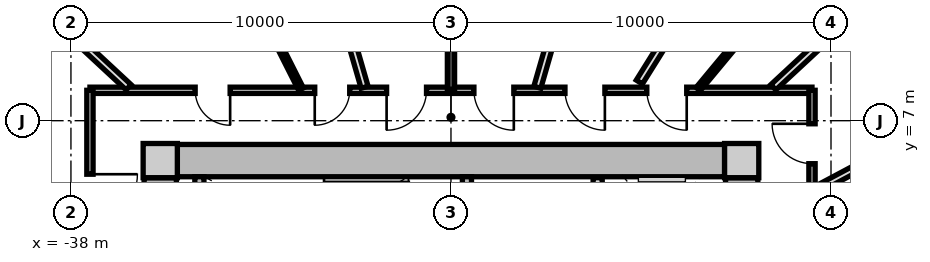
"""IFC4 building model, lengths in metres.
Left out: names, types, materials, properties, quantities, classifications, styles, units other than length and angle.
Written with IfcOpenShell. Run it as: python <this file> out.ifc"""

import sys

from ifc_helpers import new_model, si_unit, direction, frame, frame_2d, origin, origin_2d, place, context, subcontext, project, spatial, rectangle, extrude, source, transform, mapped, element, fill, save


model = new_model("IFC4")
c1 = context("Model", 3, precision=1e-05, world=origin(), true_north=direction((0.0, 1.0)))
c2 = subcontext(c1, "Body", "Model", "MODEL_VIEW")
j1 = project(units=[si_unit("LENGTHUNIT", "METRE"), si_unit("PLANEANGLEUNIT", "RADIAN")], contexts=[c1])
p1 = place(None, origin())
s1 = spatial("IfcSite", under=j1, at=p1, CompositionType="ELEMENT")
p2 = place(p1, origin())
s2 = spatial("IfcBuilding", under=s1, at=p2, CompositionType="ELEMENT")
p3 = place(p2, frame((0.0, 0.0, 27.7)))
s3 = spatial("IfcBuildingStorey", under=s2, at=p3, CompositionType="ELEMENT", Elevation=27.7)
m1 = source(origin(), c2, "Body", "SweptSolid", [
    extrude(rectangle(XDim=0.9, YDim=0.9, at=origin_2d()), origin(), (0.0, 0.0, 1.0), 3.05),
])
for number, where, z_axis, x_axis in (
    (1, (-20.35, 5.95, 0.0), (0.0, 0.0, 1.0), (1.0, 0.0, 0.0)),
    (2, (-35.65, 5.95, 0.0), (0.0, 0.0, 1.0), (1.0, 0.0, 0.0)),
):
    element("IfcColumn", number, at=place(p3, frame(where, z_axis=z_axis, x_axis=x_axis)), inside=s3, PredefinedType="COLUMN", context=c2, shape_type="MappedRepresentation", body=[
        mapped(m1, transform((0.0, 0.0, 0.0), x_axis=(1.0, 0.0, 0.0), y_axis=(0.0, 1.0, 0.0), z_axis=(0.0, 0.0, 1.0), scale=1.0)),
    ])
m2 = source(origin(), c2, "Body", "SweptSolid", [
    extrude(rectangle(XDim=14.4, YDim=0.85, at=frame_2d((7.2, 0.0))), origin(), (0.0, 0.0, 1.0), 2.79),
])
p4 = place(p3, frame((-35.2, 5.95, 0.0), z_axis=(0.0, 0.0, 1.0), x_axis=(1.0, 0.0, 0.0)))
e3 = element("IfcWall", 3, at=p4, inside=s3, PredefinedType="SHEAR", context=c2, shape_type="MappedRepresentation", body=[
    mapped(m2, transform((0.0, 0.0, 0.0), x_axis=(1.0, 0.0, 0.0), y_axis=(0.0, 1.0, 0.0), z_axis=(0.0, 0.0, 1.0), scale=1.0)),
])
m3 = source(origin(), c2, "Body", "SweptSolid", [
    extrude(rectangle(XDim=11.0, YDim=0.85, at=frame_2d((5.5, 0.0))), origin(), (0.0, 0.0, 1.0), 2.79),
])
p5 = place(p3, frame((-35.65, -5.5, 0.0), z_axis=(0.0, 0.0, 1.0), x_axis=(0.0, 1.0, 0.0)))
e4 = element("IfcWall", 4, at=p5, inside=s3, PredefinedType="SHEAR", context=c2, shape_type="MappedRepresentation", body=[
    mapped(m3, transform((0.0, 0.0, 0.0), x_axis=(1.0, 0.0, 0.0), y_axis=(0.0, 1.0, 0.0), z_axis=(0.0, 0.0, 1.0), scale=1.0)),
])
p6 = place(p5, frame((3.8, 0.0, 0.0)))
e5 = element("IfcOpeningElement", 5, at=p6, cuts=e4, PredefinedType="OPENING", context=c2, shape_type="SweptSolid", body=[
    extrude(rectangle(XDim=1.2, YDim=2.15, at=frame_2d((0.6, 1.075))), frame((0.0, 0.435, 0.0), z_axis=(0.0, -1.0, 0.0), x_axis=(1.0, 0.0, 0.0)), (0.0, 0.0, 1.0), 0.87),
])
p7 = place(p3, frame((-20.35, 5.5, 0.0), z_axis=(0.0, 0.0, 1.0), x_axis=(0.0, -1.0, 0.0)))
e6 = element("IfcWall", 6, at=p7, inside=s3, PredefinedType="SHEAR", context=c2, shape_type="MappedRepresentation", body=[
    mapped(m3, transform((0.0, 0.0, 0.0), x_axis=(1.0, 0.0, 0.0), y_axis=(0.0, 1.0, 0.0), z_axis=(0.0, 0.0, 1.0), scale=1.0)),
])
p8 = place(p7, frame((5.65, 0.0, 0.0)))
e7 = element("IfcOpeningElement", 7, at=p8, cuts=e6, PredefinedType="OPENING", context=c2, shape_type="SweptSolid", body=[
    extrude(rectangle(XDim=1.2, YDim=2.15, at=frame_2d((0.6, 1.075))), frame((0.0, 0.435, 0.0), z_axis=(0.0, -1.0, 0.0), x_axis=(1.0, 0.0, 0.0)), (0.0, 0.0, 1.0), 0.87),
])
m4 = source(origin(), c2, "Body", "SweptSolid", [
    extrude(rectangle(XDim=3.075, YDim=0.24, at=frame_2d((1.538, 0.0))), origin(), (0.0, 0.0, 1.0), 2.79),
])
p9 = place(p3, frame((-34.62, 2.45, 0.0), z_axis=(0.0, 0.0, 1.0), x_axis=(0.0, 1.0, 0.0)))
e8 = element("IfcWall", 8, at=p9, inside=s3, PredefinedType="PARTITIONING", context=c2, shape_type="MappedRepresentation", body=[
    mapped(m4, transform((0.0, 0.0, 0.0), x_axis=(1.0, 0.0, 0.0), y_axis=(0.0, 1.0, 0.0), z_axis=(0.0, 0.0, 1.0), scale=1.0)),
])
p10 = place(p3, frame((-27.58, 2.45, 0.0), z_axis=(0.0, 0.0, 1.0), x_axis=(0.0, 1.0, 0.0)))
e9 = element("IfcWall", 9, at=p10, inside=s3, PredefinedType="PARTITIONING", context=c2, shape_type="MappedRepresentation", body=[
    mapped(m4, transform((0.0, 0.0, 0.0), x_axis=(1.0, 0.0, 0.0), y_axis=(0.0, 1.0, 0.0), z_axis=(0.0, 0.0, 1.0), scale=1.0)),
])
p11 = place(p10, frame((0.55, 0.0, 0.0)))
e10 = element("IfcOpeningElement", 10, at=p11, cuts=e9, PredefinedType="OPENING", context=c2, shape_type="SweptSolid", body=[
    extrude(rectangle(XDim=1.1, YDim=2.15, at=frame_2d((0.55, 1.075))), frame((0.0, 0.13, 0.0), z_axis=(0.0, -1.0, 0.0), x_axis=(1.0, 0.0, 0.0)), (0.0, 0.0, 1.0), 0.26),
])
m5 = source(origin(), c2, "Body", "SweptSolid", [
    extrude(rectangle(XDim=5.0, YDim=0.24, at=frame_2d((2.5, 0.0))), origin(), (0.0, 0.0, 1.0), 2.775),
])
p12 = place(p3, frame((-24.14, 0.5, 0.0), z_axis=(0.0, 0.0, 1.0), x_axis=(0.0, 1.0, 0.0)))
e11 = element("IfcWall", 11, at=p12, inside=s3, PredefinedType="PARTITIONING", context=c2, shape_type="MappedRepresentation", body=[
    mapped(m5, transform((0.0, 0.0, 0.0), x_axis=(1.0, 0.0, 0.0), y_axis=(0.0, 1.0, 0.0), z_axis=(0.0, 0.0, 1.0), scale=1.0)),
])
p13 = place(p12, frame((3.05, 0.0, 0.0)))
e12 = element("IfcOpeningElement", 12, at=p13, cuts=e11, PredefinedType="OPENING", context=c2, shape_type="SweptSolid", body=[
    extrude(rectangle(XDim=1.3, YDim=2.2, at=frame_2d((0.65, 1.1))), frame((0.0, 0.13, 0.0), z_axis=(0.0, -1.0, 0.0), x_axis=(1.0, 0.0, 0.0)), (0.0, 0.0, 1.0), 0.26),
])
p14 = place(p12, frame((0.55, 0.0, 0.0)))
e13 = element("IfcOpeningElement", 13, at=p14, cuts=e11, PredefinedType="OPENING", context=c2, shape_type="SweptSolid", body=[
    extrude(rectangle(XDim=1.3, YDim=2.2, at=frame_2d((0.65, 1.1))), frame((0.0, 0.13, 0.0), z_axis=(0.0, -1.0, 0.0), x_axis=(1.0, 0.0, 0.0)), (0.0, 0.0, 1.0), 0.26),
])
m6 = source(origin(), c2, "Body", "SweptSolid", [
    extrude(rectangle(XDim=19.0, YDim=0.165, at=frame_2d((9.5, 0.0))), origin(), (0.0, 0.0, 1.0), 2.775),
])
p15 = place(p3, frame((-37.5, 7.8, 0.0), z_axis=(0.0, 0.0, 1.0), x_axis=(1.0, 0.0, 0.0)))
e14 = element("IfcWall", 14, at=p15, inside=s3, PredefinedType="PARTITIONING", context=c2, shape_type="MappedRepresentation", body=[
    mapped(m6, transform((0.0, 0.0, 0.0), x_axis=(1.0, 0.0, 0.0), y_axis=(0.0, 1.0, 0.0), z_axis=(0.0, 0.0, 1.0), scale=1.0)),
])
p16 = place(p15, frame((14.653, 0.0, 0.0)))
e15 = element("IfcOpeningElement", 15, at=p16, cuts=e14, PredefinedType="OPENING", context=c2, shape_type="SweptSolid", body=[
    extrude(rectangle(XDim=1.05, YDim=2.15, at=frame_2d((0.525, 1.075))), frame((0.0, 0.093, 0.0), z_axis=(0.0, -1.0, 0.0), x_axis=(1.0, 0.0, 0.0)), (0.0, 0.0, 1.0), 0.185),
])
p17 = place(p15, frame((12.5, 0.0, 0.0)))
e16 = element("IfcOpeningElement", 16, at=p17, cuts=e14, PredefinedType="OPENING", context=c2, shape_type="SweptSolid", body=[
    extrude(rectangle(XDim=1.05, YDim=2.15, at=frame_2d((0.525, 1.075))), frame((0.0, 0.093, 0.0), z_axis=(0.0, -1.0, 0.0), x_axis=(1.0, 0.0, 0.0)), (0.0, 0.0, 1.0), 0.185),
])
p18 = place(p15, frame((10.104, 0.0, 0.0)))
e17 = element("IfcOpeningElement", 17, at=p18, cuts=e14, PredefinedType="OPENING", context=c2, shape_type="SweptSolid", body=[
    extrude(rectangle(XDim=1.05, YDim=2.15, at=frame_2d((0.525, 1.075))), frame((0.0, 0.093, 0.0), z_axis=(0.0, -1.0, 0.0), x_axis=(1.0, 0.0, 0.0)), (0.0, 0.0, 1.0), 0.185),
])
p19 = place(p15, frame((7.806, 0.0, 0.0)))
e18 = element("IfcOpeningElement", 18, at=p19, cuts=e14, PredefinedType="OPENING", context=c2, shape_type="SweptSolid", body=[
    extrude(rectangle(XDim=1.05, YDim=2.15, at=frame_2d((0.525, 1.075))), frame((0.0, 0.093, 0.0), z_axis=(0.0, -1.0, 0.0), x_axis=(1.0, 0.0, 0.0)), (0.0, 0.0, 1.0), 0.185),
])
p20 = place(p15, frame((5.915, 0.0, 0.0)))
e19 = element("IfcOpeningElement", 19, at=p20, cuts=e14, PredefinedType="OPENING", context=c2, shape_type="SweptSolid", body=[
    extrude(rectangle(XDim=0.92, YDim=2.1, at=frame_2d((0.46, 1.05))), frame((0.0, 0.093, 0.0), z_axis=(0.0, -1.0, 0.0), x_axis=(1.0, 0.0, 0.0)), (0.0, 0.0, 1.0), 0.185),
])
p21 = place(p15, frame((2.769, 0.0, 0.0)))
e20 = element("IfcOpeningElement", 20, at=p21, cuts=e14, PredefinedType="OPENING", context=c2, shape_type="SweptSolid", body=[
    extrude(rectangle(XDim=0.92, YDim=2.1, at=frame_2d((0.46, 1.05))), frame((0.0, 0.093, 0.0), z_axis=(0.0, -1.0, 0.0), x_axis=(1.0, 0.0, 0.0)), (0.0, 0.0, 1.0), 0.185),
])
m7 = source(origin(), c2, "Body", "SweptSolid", [
    extrude(rectangle(XDim=15.6, YDim=0.165, at=frame_2d((7.8, 0.0))), origin(), (0.0, 0.0, 1.0), 2.775),
])
p22 = place(p3, frame((-37.5, -7.8, 0.0), z_axis=(0.0, 0.0, 1.0), x_axis=(0.0, 1.0, 0.0)))
e21 = element("IfcWall", 21, at=p22, inside=s3, PredefinedType="PARTITIONING", context=c2, shape_type="MappedRepresentation", body=[
    mapped(m7, transform((0.0, 0.0, 0.0), x_axis=(1.0, 0.0, 0.0), y_axis=(0.0, 1.0, 0.0), z_axis=(0.0, 0.0, 1.0), scale=1.0)),
])
p23 = place(p22, frame((12.141, 0.0, 0.0)))
e22 = element("IfcOpeningElement", 22, at=p23, cuts=e21, PredefinedType="OPENING", context=c2, shape_type="SweptSolid", body=[
    extrude(rectangle(XDim=1.25, YDim=2.2, at=frame_2d((0.625, 1.1))), frame((0.0, 0.093, 0.0), z_axis=(0.0, -1.0, 0.0), x_axis=(1.0, 0.0, 0.0)), (0.0, 0.0, 1.0), 0.185),
])
p24 = place(p22, frame((7.175, 0.0, 0.0)))
e23 = element("IfcOpeningElement", 23, at=p24, cuts=e21, PredefinedType="OPENING", context=c2, shape_type="SweptSolid", body=[
    extrude(rectangle(XDim=1.25, YDim=2.2, at=frame_2d((0.625, 1.1))), frame((0.0, 0.093, 0.0), z_axis=(0.0, -1.0, 0.0), x_axis=(1.0, 0.0, 0.0)), (0.0, 0.0, 1.0), 0.185),
])
p25 = place(p22, frame((2.208, 0.0, 0.0)))
e24 = element("IfcOpeningElement", 24, at=p25, cuts=e21, PredefinedType="OPENING", context=c2, shape_type="SweptSolid", body=[
    extrude(rectangle(XDim=1.25, YDim=2.2, at=frame_2d((0.625, 1.1))), frame((0.0, 0.093, 0.0), z_axis=(0.0, -1.0, 0.0), x_axis=(1.0, 0.0, 0.0)), (0.0, 0.0, 1.0), 0.185),
])
p26 = place(p3, frame((-18.5, 7.8, 0.0), z_axis=(0.0, 0.0, 1.0), x_axis=(0.0, -1.0, 0.0)))
e25 = element("IfcWall", 25, at=p26, inside=s3, PredefinedType="PARTITIONING", context=c2, shape_type="MappedRepresentation", body=[
    mapped(m7, transform((0.0, 0.0, 0.0), x_axis=(1.0, 0.0, 0.0), y_axis=(0.0, 1.0, 0.0), z_axis=(0.0, 0.0, 1.0), scale=1.0)),
])
p27 = place(p26, frame((12.141, 0.0, 0.0)))
e26 = element("IfcOpeningElement", 26, at=p27, cuts=e25, PredefinedType="OPENING", context=c2, shape_type="SweptSolid", body=[
    extrude(rectangle(XDim=1.25, YDim=2.2, at=frame_2d((0.625, 1.1))), frame((0.0, 0.093, 0.0), z_axis=(0.0, -1.0, 0.0), x_axis=(1.0, 0.0, 0.0)), (0.0, 0.0, 1.0), 0.185),
])
p28 = place(p26, frame((7.175, 0.0, 0.0)))
e27 = element("IfcOpeningElement", 27, at=p28, cuts=e25, PredefinedType="OPENING", context=c2, shape_type="SweptSolid", body=[
    extrude(rectangle(XDim=1.25, YDim=2.2, at=frame_2d((0.625, 1.1))), frame((0.0, 0.093, 0.0), z_axis=(0.0, -1.0, 0.0), x_axis=(1.0, 0.0, 0.0)), (0.0, 0.0, 1.0), 0.185),
])
p29 = place(p26, frame((2.826, 0.0, 0.0)))
e28 = element("IfcOpeningElement", 28, at=p29, cuts=e25, PredefinedType="OPENING", context=c2, shape_type="SweptSolid", body=[
    extrude(rectangle(XDim=1.05, YDim=2.15, at=frame_2d((0.525, 1.075))), frame((0.0, 0.093, 0.0), z_axis=(0.0, -1.0, 0.0), x_axis=(1.0, 0.0, 0.0)), (0.0, 0.0, 1.0), 0.185),
])
p30 = place(p26, frame((0.881, 0.0, 0.0)))
e29 = element("IfcOpeningElement", 29, at=p30, cuts=e25, PredefinedType="OPENING", context=c2, shape_type="SweptSolid", body=[
    extrude(rectangle(XDim=1.05, YDim=2.15, at=frame_2d((0.525, 1.075))), frame((0.0, 0.093, 0.0), z_axis=(0.0, -1.0, 0.0), x_axis=(1.0, 0.0, 0.0)), (0.0, 0.0, 1.0), 0.185),
])
m8 = source(origin(), c2, "Body", "SweptSolid", [
    extrude(rectangle(XDim=7.435, YDim=0.19, at=frame_2d((3.717, 0.0))), origin(), (0.0, 0.0, 1.0), 2.225),
])
p31 = place(p3, frame((-19.517, 7.88, 0.0), z_axis=(0.0, 0.0, 1.0), x_axis=(0.732651956848, 0.680603489652, 0.0)))
e30 = element("IfcWall", 30, at=p31, inside=s3, PredefinedType="PARTITIONING", context=c2, shape_type="MappedRepresentation", body=[
    mapped(m8, transform((0.0, 0.0, 0.0), x_axis=(1.0, 0.0, 0.0), y_axis=(0.0, 1.0, 0.0), z_axis=(0.0, 0.0, 1.0), scale=1.0)),
])
m9 = source(origin(), c2, "Body", "SweptSolid", [
    extrude(rectangle(XDim=10.196, YDim=0.19, at=frame_2d((5.098, 0.0))), origin(), (0.0, 0.0, 1.0), 2.225),
])
p32 = place(p3, frame((-25.727, 7.88, 0.0), z_axis=(0.0, 0.0, 1.0), x_axis=(0.277136420347, 0.960830580549, 0.0)))
e31 = element("IfcWall", 31, at=p32, inside=s3, PredefinedType="PARTITIONING", context=c2, shape_type="MappedRepresentation", body=[
    mapped(m9, transform((0.0, 0.0, 0.0), x_axis=(1.0, 0.0, 0.0), y_axis=(0.0, 1.0, 0.0), z_axis=(0.0, 0.0, 1.0), scale=1.0)),
])
m10 = source(origin(), c2, "Body", "SweptSolid", [
    extrude(rectangle(XDim=8.598, YDim=0.19, at=frame_2d((4.299, 0.0))), origin(), (0.0, 0.0, 1.0), 2.775),
])
p33 = place(p3, frame((-23.043, 8.017, 0.0), z_axis=(0.0, 0.0, 1.0), x_axis=(0.530039776395, 0.847972779893, 0.0)))
e32 = element("IfcWall", 32, at=p33, inside=s3, PredefinedType="PARTITIONING", context=c2, shape_type="MappedRepresentation", body=[
    mapped(m10, transform((0.0, 0.0, 0.0), x_axis=(1.0, 0.0, 0.0), y_axis=(0.0, 1.0, 0.0), z_axis=(0.0, 0.0, 1.0), scale=1.0)),
])
m11 = source(origin(), c2, "Body", "SweptSolid", [
    extrude(rectangle(XDim=3.594, YDim=0.14, at=frame_2d((1.797, 0.0))), origin(), (0.0, 0.0, 1.0), 2.775),
])
p34 = place(p3, frame((-21.496, 7.83, 0.0), z_axis=(0.0, 0.0, 1.0), x_axis=(0.639001147083, 0.769205781326, 0.0)))
e33 = element("IfcWall", 33, at=p34, inside=s3, PredefinedType="PARTITIONING", context=c2, shape_type="MappedRepresentation", body=[
    mapped(m11, transform((0.0, 0.0, 0.0), x_axis=(1.0, 0.0, 0.0), y_axis=(0.0, 1.0, 0.0), z_axis=(0.0, 0.0, 1.0), scale=1.0)),
])
p35 = place(p34, frame((1.337, 0.0, 0.0)))
e34 = element("IfcOpeningElement", 34, at=p35, cuts=e33, PredefinedType="OPENING", context=c2, shape_type="SweptSolid", body=[
    extrude(rectangle(XDim=0.92, YDim=2.1, at=frame_2d((0.46, 1.05))), frame((0.0, 0.08, 0.0), z_axis=(0.0, -1.0, 0.0), x_axis=(1.0, 0.0, 0.0)), (0.0, 0.0, 1.0), 0.16),
])
p36 = place(p3, frame((-30.273, 7.88, 0.0), z_axis=(0.0, 0.0, 1.0), x_axis=(-0.277136420347, 0.960830580549, 0.0)))
e35 = element("IfcWall", 35, at=p36, inside=s3, PredefinedType="PARTITIONING", context=c2, shape_type="MappedRepresentation", body=[
    mapped(m9, transform((0.0, 0.0, 0.0), x_axis=(1.0, 0.0, 0.0), y_axis=(0.0, 1.0, 0.0), z_axis=(0.0, 0.0, 1.0), scale=1.0)),
])
m12 = source(origin(), c2, "Body", "SweptSolid", [
    extrude(rectangle(XDim=9.846, YDim=0.19, at=frame_2d((4.923, 0.0))), origin(), (0.0, 0.0, 1.0), 2.775),
])
p37 = place(p3, frame((-28.0, 7.83, 0.0), z_axis=(0.0, 0.0, 1.0), x_axis=(0.0, 1.0, 0.0)))
e36 = element("IfcWall", 36, at=p37, inside=s3, PredefinedType="PARTITIONING", context=c2, shape_type="MappedRepresentation", body=[
    mapped(m12, transform((0.0, 0.0, 0.0), x_axis=(1.0, 0.0, 0.0), y_axis=(0.0, 1.0, 0.0), z_axis=(0.0, 0.0, 1.0), scale=1.0)),
])
p38 = place(p3, frame((-36.483, 7.88, 0.0), z_axis=(0.0, 0.0, 1.0), x_axis=(-0.732651956848, 0.680603489652, 0.0)))
e37 = element("IfcWall", 37, at=p38, inside=s3, PredefinedType="PARTITIONING", context=c2, shape_type="MappedRepresentation", body=[
    mapped(m8, transform((0.0, 0.0, 0.0), x_axis=(1.0, 0.0, 0.0), y_axis=(0.0, 1.0, 0.0), z_axis=(0.0, 0.0, 1.0), scale=1.0)),
])
m13 = source(origin(), c2, "Body", "SweptSolid", [
    extrude(rectangle(XDim=9.225, YDim=0.14, at=frame_2d((4.613, 0.0))), origin(), (0.0, 0.0, 1.0), 2.775),
])
p39 = place(p3, frame((-31.946, 7.83, 0.0), z_axis=(0.0, 0.0, 1.0), x_axis=(-0.450460543767, 0.892796336523, 0.0)))
e38 = element("IfcWall", 38, at=p39, inside=s3, PredefinedType="PARTITIONING", context=c2, shape_type="MappedRepresentation", body=[
    mapped(m13, transform((0.0, 0.0, 0.0), x_axis=(1.0, 0.0, 0.0), y_axis=(0.0, 1.0, 0.0), z_axis=(0.0, 0.0, 1.0), scale=1.0)),
])
m14 = source(origin(), c2, "Body", "SweptSolid", [
    extrude(rectangle(XDim=7.677, YDim=0.19, at=frame_2d((3.838, 0.0))), origin(), (0.0, 0.0, 1.0), 2.775),
])
p40 = place(p3, frame((-18.297, 5.231, 0.0), z_axis=(0.0, 0.0, 1.0), x_axis=(0.882725057546, 0.469889851753, 0.0)))
e39 = element("IfcWall", 39, at=p40, inside=s3, PredefinedType="PARTITIONING", context=c2, shape_type="MappedRepresentation", body=[
    mapped(m14, transform((0.0, 0.0, 0.0), x_axis=(1.0, 0.0, 0.0), y_axis=(0.0, 1.0, 0.0), z_axis=(0.0, 0.0, 1.0), scale=1.0)),
])
m15 = source(origin(), c2, "Body", "SweptSolid", [
    extrude(rectangle(XDim=1.05, YDim=2.15, at=frame_2d((0.525, 1.075))), frame((0.0, 0.025, 0.0), z_axis=(0.0, -1.0, 0.0), x_axis=(1.0, 0.0, 0.0)), (0.0, 0.0, 1.0), 0.05),
])
p41 = place(p16, frame((1.05, 0.0, 0.0), z_axis=(0.0, 0.0, 1.0), x_axis=(-1.0, 0.0, 0.0)))
e40 = element("IfcDoor", 40, at=p41, inside=s3, OperationType="SINGLE_SWING_LEFT", PredefinedType="DOOR", context=c2, shape_type="MappedRepresentation", body=[
    mapped(m15, transform((0.0, 0.0, 0.0), x_axis=(1.0, 0.0, 0.0), y_axis=(0.0, 1.0, 0.0), z_axis=(0.0, 0.0, 1.0), scale=1.0)),
])
fill(e15, e40)
p42 = place(p17, frame((1.05, 0.0, 0.0), z_axis=(0.0, 0.0, 1.0), x_axis=(-1.0, 0.0, 0.0)))
e41 = element("IfcDoor", 41, at=p42, inside=s3, OperationType="SINGLE_SWING_LEFT", PredefinedType="DOOR", context=c2, shape_type="MappedRepresentation", body=[
    mapped(m15, transform((0.0, 0.0, 0.0), x_axis=(1.0, 0.0, 0.0), y_axis=(0.0, 1.0, 0.0), z_axis=(0.0, 0.0, 1.0), scale=1.0)),
])
fill(e16, e41)
p43 = place(p18, frame((1.05, 0.0, 0.0), z_axis=(0.0, 0.0, 1.0), x_axis=(-1.0, 0.0, 0.0)))
e42 = element("IfcDoor", 42, at=p43, inside=s3, OperationType="SINGLE_SWING_LEFT", PredefinedType="DOOR", context=c2, shape_type="MappedRepresentation", body=[
    mapped(m15, transform((0.0, 0.0, 0.0), x_axis=(1.0, 0.0, 0.0), y_axis=(0.0, 1.0, 0.0), z_axis=(0.0, 0.0, 1.0), scale=1.0)),
])
fill(e17, e42)
p44 = place(p19, frame((1.05, 0.0, 0.0), z_axis=(0.0, 0.0, 1.0), x_axis=(-1.0, 0.0, 0.0)))
e43 = element("IfcDoor", 43, at=p44, inside=s3, OperationType="SINGLE_SWING_RIGHT", PredefinedType="DOOR", context=c2, shape_type="MappedRepresentation", body=[
    mapped(m15, transform((0.0, 0.0, 0.0), x_axis=(1.0, 0.0, 0.0), y_axis=(0.0, 1.0, 0.0), z_axis=(0.0, 0.0, 1.0), scale=1.0)),
])
fill(e18, e43)
m16 = source(origin(), c2, "Body", "SweptSolid", [
    extrude(rectangle(XDim=0.92, YDim=2.1, at=frame_2d((0.46, 1.05))), frame((0.0, 0.025, 0.0), z_axis=(0.0, -1.0, 0.0), x_axis=(1.0, 0.0, 0.0)), (0.0, 0.0, 1.0), 0.05),
])
p45 = place(p20, frame((0.92, 0.0, 0.0), z_axis=(0.0, 0.0, 1.0), x_axis=(-1.0, 0.0, 0.0)))
e44 = element("IfcDoor", 44, at=p45, inside=s3, OperationType="SINGLE_SWING_RIGHT", PredefinedType="DOOR", context=c2, shape_type="MappedRepresentation", body=[
    mapped(m16, transform((0.0, 0.0, 0.0), x_axis=(1.0, 0.0, 0.0), y_axis=(0.0, 1.0, 0.0), z_axis=(0.0, 0.0, 1.0), scale=1.0)),
])
fill(e19, e44)
p46 = place(p21, frame((0.92, 0.0, 0.0), z_axis=(0.0, 0.0, 1.0), x_axis=(-1.0, 0.0, 0.0)))
e45 = element("IfcDoor", 45, at=p46, inside=s3, OperationType="SINGLE_SWING_LEFT", PredefinedType="DOOR", context=c2, shape_type="MappedRepresentation", body=[
    mapped(m16, transform((0.0, 0.0, 0.0), x_axis=(1.0, 0.0, 0.0), y_axis=(0.0, 1.0, 0.0), z_axis=(0.0, 0.0, 1.0), scale=1.0)),
])
fill(e20, e45)
m17 = source(origin(), c2, "Body", "SweptSolid", [
    extrude(rectangle(XDim=1.25, YDim=2.2, at=frame_2d((0.625, 1.1))), frame((0.0, 0.025, 0.0), z_axis=(0.0, -1.0, 0.0), x_axis=(1.0, 0.0, 0.0)), (0.0, 0.0, 1.0), 0.05),
])
p47 = place(p23, frame((1.25, 0.0, 0.0), z_axis=(0.0, 0.0, 1.0), x_axis=(-1.0, 0.0, 0.0)))
e46 = element("IfcDoor", 46, at=p47, inside=s3, OperationType="SINGLE_SWING_LEFT", PredefinedType="DOOR", context=c2, shape_type="MappedRepresentation", body=[
    mapped(m17, transform((0.0, 0.0, 0.0), x_axis=(1.0, 0.0, 0.0), y_axis=(0.0, 1.0, 0.0), z_axis=(0.0, 0.0, 1.0), scale=1.0)),
])
fill(e22, e46)
p48 = place(p30, frame((1.05, 0.0, 0.0), z_axis=(0.0, 0.0, 1.0), x_axis=(-1.0, 0.0, 0.0)))
e47 = element("IfcDoor", 47, at=p48, inside=s3, OperationType="SINGLE_SWING_RIGHT", PredefinedType="DOOR", context=c2, shape_type="MappedRepresentation", body=[
    mapped(m15, transform((0.0, 0.0, 0.0), x_axis=(1.0, 0.0, 0.0), y_axis=(0.0, 1.0, 0.0), z_axis=(0.0, 0.0, 1.0), scale=1.0)),
])
fill(e29, e47)
save(model, sys.argv[1])
